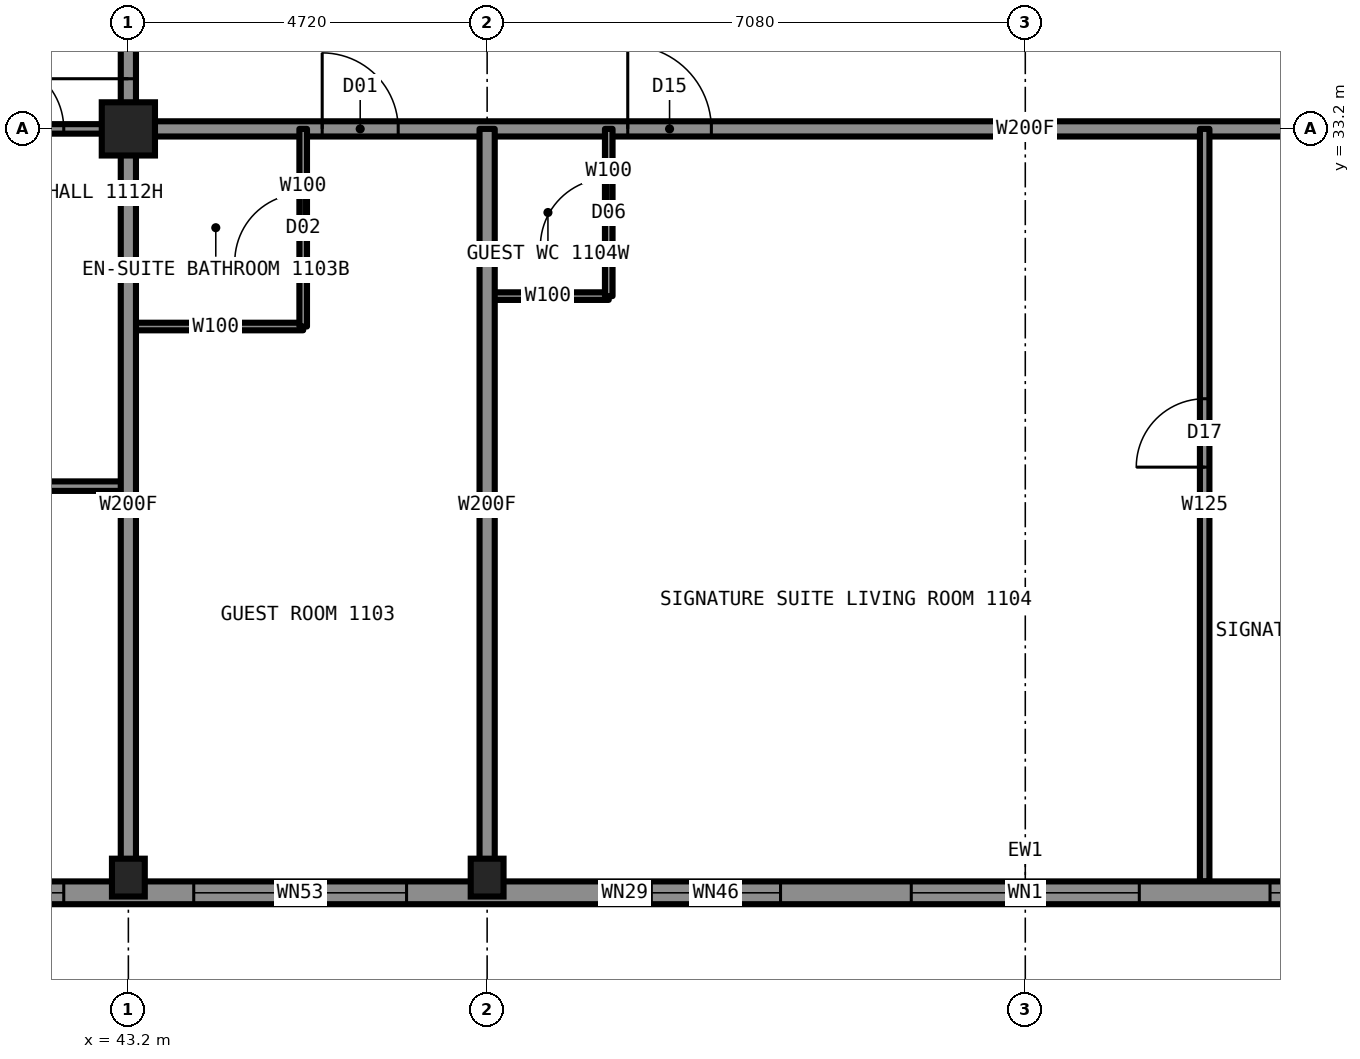
"""IFC4 building model, lengths in metres.
Left out: names, types, materials, properties, quantities, classifications, styles, units other than length and angle.
Written with IfcOpenShell. Run it as: python <this file> out.ifc"""

import sys

from ifc_helpers import new_model, si_unit, direction, frame, frame_2d, origin, origin_2d, place, context, subcontext, project, spatial, rectangle, hollow_rectangle, i_section, extrude, element, fill, save


model = new_model("IFC4")
c1 = context("Model", 3, precision=1e-05, world=origin(), true_north=direction((0.0, 1.0)))
c2 = subcontext(c1, "Body", "Model", "MODEL_VIEW")
j1 = project(units=[si_unit("LENGTHUNIT", "METRE"), si_unit("PLANEANGLEUNIT", "RADIAN")], contexts=[c1])
p1 = place(None, origin())
s1 = spatial("IfcSite", under=j1, at=p1, CompositionType="ELEMENT")
p2 = place(p1, origin())
s2 = spatial("IfcBuilding", under=s1, at=p2, CompositionType="ELEMENT")
p3 = place(p2, frame((0.0, 0.0, 39.0)))
s3 = spatial("IfcBuildingStorey", under=s2, at=p3, CompositionType="ELEMENT", Elevation=39.0)
for number, where, z_axis, x_axis in (
    (1, (43.2, 23.35, 0.0), (0.0, 0.0, 1.0), (1.0, 0.0, 0.0)),
    (2, (47.92, 23.35, 0.0), (0.0, 0.0, 1.0), (1.0, 0.0, 0.0)),
):
    element("IfcColumn", number, at=place(p3, frame(where, z_axis=z_axis, x_axis=x_axis)), inside=s3, PredefinedType="COLUMN", context=c2, shape_type="SweptSolid", body=[
        extrude(i_section(OverallWidth=0.432, OverallDepth=0.498, WebThickness=0.056, FlangeThickness=0.089, at=origin_2d()), origin(), (0.0, 0.0, 1.0), 3.5),
    ])
p4 = place(p3, frame((43.2, 33.2, 0.0), z_axis=(0.0, 0.0, 1.0), x_axis=(1.0, 0.0, 0.0)))
e3 = element("IfcColumn", 3, at=p4, inside=s3, PredefinedType="COLUMN", context=c2, shape_type="SweptSolid", body=[
    extrude(hollow_rectangle(XDim=0.7, YDim=0.7, WallThickness=0.06, at=origin_2d()), origin(), (0.0, 0.0, 1.0), 3.5),
])
p5 = place(p3, frame((43.2, 33.2, 0.0), z_axis=(0.0, 0.0, 1.0), x_axis=(1.0, 0.0, 0.0)))
e4 = element("IfcWall", 4, at=p5, inside=s3, PredefinedType="PARTITIONING", context=c2, shape_type="SweptSolid", body=[
    extrude(rectangle(XDim=23.6, YDim=0.2, at=frame_2d((11.8, 0.0))), origin(), (0.0, 0.0, 1.0), 3.33),
])
p6 = place(p5, frame((2.55, 0.0, 0.0)))
e5 = element("IfcOpeningElement", 5, at=p6, cuts=e4, PredefinedType="OPENING", context=c2, shape_type="SweptSolid", body=[
    extrude(rectangle(XDim=1.0, YDim=2.2, at=frame_2d((0.5, 1.1))), frame((0.0, 0.11, 0.0), z_axis=(0.0, -1.0, 0.0), x_axis=(1.0, 0.0, 0.0)), (0.0, 0.0, 1.0), 0.22),
])
p7 = place(p5, frame((6.57, 0.0, 0.0)))
e6 = element("IfcOpeningElement", 6, at=p7, cuts=e4, PredefinedType="OPENING", context=c2, shape_type="SweptSolid", body=[
    extrude(rectangle(XDim=1.1, YDim=2.2, at=frame_2d((0.55, 1.1))), frame((0.0, 0.11, 0.0), z_axis=(0.0, -1.0, 0.0), x_axis=(1.0, 0.0, 0.0)), (0.0, 0.0, 1.0), 0.22),
])
p8 = place(p5, frame((20.34, 0.0, 0.0)))
e7 = element("IfcOpeningElement", 7, at=p8, cuts=e4, PredefinedType="OPENING", context=c2, shape_type="SweptSolid", body=[
    extrude(rectangle(XDim=1.0, YDim=2.2, at=frame_2d((0.5, 1.1))), frame((0.0, 0.11, 0.0), z_axis=(0.0, -1.0, 0.0), x_axis=(1.0, 0.0, 0.0)), (0.0, 0.0, 1.0), 0.22),
])
p9 = place(p3, frame((33.3, 33.2, 0.0), z_axis=(0.0, 0.0, 1.0), x_axis=(1.0, 0.0, 0.0)))
e8 = element("IfcWall", 8, at=p9, inside=s3, PredefinedType="PARTITIONING", context=c2, shape_type="SweptSolid", body=[
    extrude(rectangle(XDim=9.9, YDim=0.125, at=frame_2d((4.95, 0.0))), origin(), (0.0, 0.0, 1.0), 2.573),
])
p10 = place(p9, frame((8.15, 0.0, 0.0)))
e9 = element("IfcOpeningElement", 9, at=p10, cuts=e8, PredefinedType="OPENING", context=c2, shape_type="SweptSolid", body=[
    extrude(rectangle(XDim=0.9, YDim=2.2, at=frame_2d((0.45, 1.1))), frame((0.0, 0.073, 0.0), z_axis=(0.0, -1.0, 0.0), x_axis=(1.0, 0.0, 0.0)), (0.0, 0.0, 1.0), 0.145),
])
p11 = place(p3, frame((47.92, 31.0, 0.0), z_axis=(0.0, 0.0, 1.0), x_axis=(1.0, 0.0, 0.0)))
e10 = element("IfcWall", 10, at=p11, inside=s3, PredefinedType="PARTITIONING", context=c2, shape_type="SweptSolid", body=[
    extrude(rectangle(XDim=1.6, YDim=0.1, at=frame_2d((0.8, 0.0))), origin(), (0.0, 0.0, 1.0), 3.33),
])
p12 = place(p3, frame((43.2, 30.6, 0.0), z_axis=(0.0, 0.0, 1.0), x_axis=(1.0, 0.0, 0.0)))
e11 = element("IfcWall", 11, at=p12, inside=s3, PredefinedType="PARTITIONING", context=c2, shape_type="SweptSolid", body=[
    extrude(rectangle(XDim=2.3, YDim=0.1, at=frame_2d((1.15, 0.0))), origin(), (0.0, 0.0, 1.0), 3.33),
])
p13 = place(p3, frame((33.306, 28.5, 0.0), z_axis=(0.0, 0.0, 1.0), x_axis=(1.0, 0.0, 0.0)))
e12 = element("IfcWall", 12, at=p13, inside=s3, PredefinedType="PARTITIONING", context=c2, shape_type="SweptSolid", body=[
    extrude(rectangle(XDim=9.894, YDim=0.125, at=frame_2d((4.947, 0.0))), origin(), (0.0, 0.0, 1.0), 3.33),
])
p14 = place(p13, frame((7.244, 0.0, 0.0)))
e13 = element("IfcOpeningElement", 13, at=p14, cuts=e12, PredefinedType="OPENING", context=c2, shape_type="SweptSolid", body=[
    extrude(rectangle(XDim=0.9, YDim=2.2, at=frame_2d((0.45, 1.1))), frame((0.0, 0.073, 0.0), z_axis=(0.0, -1.0, 0.0), x_axis=(1.0, 0.0, 0.0)), (0.0, 0.0, 1.0), 0.145),
])
p15 = place(p3, frame((43.2, 33.2, 0.0), z_axis=(0.0, 0.0, 1.0), x_axis=(0.0, 1.0, 0.0)))
e14 = element("IfcWall", 14, at=p15, inside=s3, PredefinedType="PARTITIONING", context=c2, shape_type="SweptSolid", body=[
    extrude(rectangle(XDim=23.58, YDim=0.2, at=frame_2d((11.79, 0.0))), origin(), (0.0, 0.0, 1.0), 3.33),
])
p16 = place(p15, frame((7.27, 0.0, 0.0)))
e15 = element("IfcOpeningElement", 15, at=p16, cuts=e14, PredefinedType="OPENING", context=c2, shape_type="SweptSolid", body=[
    extrude(rectangle(XDim=1.0, YDim=2.2, at=frame_2d((0.5, 1.1))), frame((0.0, 0.11, 0.0), z_axis=(0.0, -1.0, 0.0), x_axis=(1.0, 0.0, 0.0)), (0.0, 0.0, 1.0), 0.22),
])
p17 = place(p15, frame((12.44, 0.0, 0.0)))
e16 = element("IfcOpeningElement", 16, at=p17, cuts=e14, PredefinedType="OPENING", context=c2, shape_type="SweptSolid", body=[
    extrude(rectangle(XDim=1.0, YDim=2.2, at=frame_2d((0.5, 1.1))), frame((0.0, 0.11, 0.0), z_axis=(0.0, -1.0, 0.0), x_axis=(1.0, 0.0, 0.0)), (0.0, 0.0, 1.0), 0.22),
])
p18 = place(p15, frame((21.84, 0.0, 0.0)))
e17 = element("IfcOpeningElement", 17, at=p18, cuts=e14, PredefinedType="OPENING", context=c2, shape_type="SweptSolid", body=[
    extrude(rectangle(XDim=1.1, YDim=2.2, at=frame_2d((0.55, 1.1))), frame((0.0, 0.11, 0.0), z_axis=(0.0, -1.0, 0.0), x_axis=(1.0, 0.0, 0.0)), (0.0, 0.0, 1.0), 0.22),
])
p19 = place(p15, frame((0.66, 0.0, 0.0)))
e18 = element("IfcOpeningElement", 18, at=p19, cuts=e14, PredefinedType="OPENING", context=c2, shape_type="SweptSolid", body=[
    extrude(rectangle(XDim=1.1, YDim=2.2, at=frame_2d((0.55, 1.1))), frame((0.0, 0.11, 0.0), z_axis=(0.0, -1.0, 0.0), x_axis=(1.0, 0.0, 0.0)), (0.0, 0.0, 1.0), 0.22),
])
p20 = place(p3, frame((43.2, 23.3, 0.0), z_axis=(0.0, 0.0, 1.0), x_axis=(0.0, 1.0, 0.0)))
e19 = element("IfcWall", 19, at=p20, inside=s3, PredefinedType="PARTITIONING", context=c2, shape_type="SweptSolid", body=[
    extrude(rectangle(XDim=9.9, YDim=0.2, at=frame_2d((4.95, 0.0))), origin(), (0.0, 0.0, 1.0), 2.573),
])
p21 = place(p3, frame((49.52, 31.0, 0.0), z_axis=(0.0, 0.0, 1.0), x_axis=(0.0, 1.0, 0.0)))
e20 = element("IfcWall", 20, at=p21, inside=s3, PredefinedType="PARTITIONING", context=c2, shape_type="SweptSolid", body=[
    extrude(rectangle(XDim=2.2, YDim=0.1, at=frame_2d((1.1, 0.0))), origin(), (0.0, 0.0, 1.0), 3.33),
])
p22 = place(p21, frame((0.65, 0.0, 0.0)))
e21 = element("IfcOpeningElement", 21, at=p22, cuts=e20, PredefinedType="OPENING", context=c2, shape_type="SweptSolid", body=[
    extrude(rectangle(XDim=0.9, YDim=2.1, at=frame_2d((0.45, 1.05))), frame((0.0, 0.06, 0.0), z_axis=(0.0, -1.0, 0.0), x_axis=(1.0, 0.0, 0.0)), (0.0, 0.0, 1.0), 0.12),
])
p23 = place(p3, frame((47.92, 23.3, 0.0), z_axis=(0.0, 0.0, 1.0), x_axis=(0.0, 1.0, 0.0)))
e22 = element("IfcWall", 22, at=p23, inside=s3, PredefinedType="PARTITIONING", context=c2, shape_type="SweptSolid", body=[
    extrude(rectangle(XDim=9.9, YDim=0.2, at=frame_2d((4.95, 0.0))), origin(), (0.0, 0.0, 1.0), 2.573),
])
p24 = place(p3, frame((45.5, 30.6, 0.0), z_axis=(0.0, 0.0, 1.0), x_axis=(0.0, 1.0, 0.0)))
e23 = element("IfcWall", 23, at=p24, inside=s3, PredefinedType="PARTITIONING", context=c2, shape_type="SweptSolid", body=[
    extrude(rectangle(XDim=2.6, YDim=0.1, at=frame_2d((1.3, 0.0))), origin(), (0.0, 0.0, 1.0), 3.33),
])
p25 = place(p24, frame((0.85, 0.0, 0.0)))
e24 = element("IfcOpeningElement", 24, at=p25, cuts=e23, PredefinedType="OPENING", context=c2, shape_type="SweptSolid", body=[
    extrude(rectangle(XDim=0.9, YDim=2.1, at=frame_2d((0.45, 1.05))), frame((0.0, 0.06, 0.0), z_axis=(0.0, -1.0, 0.0), x_axis=(1.0, 0.0, 0.0)), (0.0, 0.0, 1.0), 0.12),
])
p26 = place(p3, frame((57.36, 23.3, 0.0), z_axis=(0.0, 0.0, 1.0), x_axis=(0.0, 1.0, 0.0)))
e25 = element("IfcWall", 25, at=p26, inside=s3, PredefinedType="PARTITIONING", context=c2, shape_type="SweptSolid", body=[
    extrude(rectangle(XDim=9.9, YDim=0.125, at=frame_2d((4.95, 0.0))), origin(), (0.0, 0.0, 1.0), 3.33),
])
p27 = place(p26, frame((5.45, 0.0, 0.0)))
e26 = element("IfcOpeningElement", 26, at=p27, cuts=e25, PredefinedType="OPENING", context=c2, shape_type="SweptSolid", body=[
    extrude(rectangle(XDim=0.9, YDim=2.2, at=frame_2d((0.45, 1.1))), frame((0.0, 0.073, 0.0), z_axis=(0.0, -1.0, 0.0), x_axis=(1.0, 0.0, 0.0)), (0.0, 0.0, 1.0), 0.145),
])
p28 = place(p3, frame((38.5, 23.15, 0.0), z_axis=(0.0, 0.0, 1.0), x_axis=(1.0, 0.0, 0.0)))
e27 = element("IfcWall", 27, at=p28, inside=s3, PredefinedType="SOLIDWALL", context=c2, shape_type="SweptSolid", body=[
    extrude(rectangle(XDim=33.0, YDim=0.3, at=frame_2d((16.5, 0.0))), origin(), (0.0, 0.0, 1.0), 2.83),
])
p29 = place(p28, frame((0.85, 0.0, 0.5)))
e28 = element("IfcOpeningElement", 28, at=p29, cuts=e27, PredefinedType="OPENING", context=c2, shape_type="SweptSolid", body=[
    extrude(rectangle(XDim=2.5, YDim=2.0, at=frame_2d((1.25, 1.0))), frame((0.0, 0.16, 0.0), z_axis=(0.0, -1.0, 0.0), x_axis=(1.0, 0.0, 0.0)), (0.0, 0.0, 1.0), 0.32),
])
p30 = place(p28, frame((6.61, 0.0, 0.5)))
e29 = element("IfcOpeningElement", 29, at=p30, cuts=e27, PredefinedType="OPENING", context=c2, shape_type="SweptSolid", body=[
    extrude(rectangle(XDim=1.9, YDim=1.9, at=frame_2d((0.95, 0.95))), frame((0.0, 0.16, 0.0), z_axis=(0.0, -1.0, 0.0), x_axis=(1.0, 0.0, 0.0)), (0.0, 0.0, 1.0), 0.32),
])
p31 = place(p28, frame((10.28, 0.0, 0.5)))
e30 = element("IfcOpeningElement", 30, at=p31, cuts=e27, PredefinedType="OPENING", context=c2, shape_type="SweptSolid", body=[
    extrude(rectangle(XDim=3.0, YDim=2.0, at=frame_2d((1.5, 1.0))), frame((0.0, 0.16, 0.0), z_axis=(0.0, -1.0, 0.0), x_axis=(1.0, 0.0, 0.0)), (0.0, 0.0, 1.0), 0.32),
])
p32 = place(p28, frame((15.0, 0.0, 0.5)))
e31 = element("IfcOpeningElement", 31, at=p32, cuts=e27, PredefinedType="OPENING", context=c2, shape_type="SweptSolid", body=[
    extrude(rectangle(XDim=3.0, YDim=2.0, at=frame_2d((1.5, 1.0))), frame((0.0, 0.16, 0.0), z_axis=(0.0, -1.0, 0.0), x_axis=(1.0, 0.0, 0.0)), (0.0, 0.0, 1.0), 0.32),
])
p33 = place(p28, frame((19.72, 0.0, 0.5)))
e32 = element("IfcOpeningElement", 32, at=p33, cuts=e27, PredefinedType="OPENING", context=c2, shape_type="SweptSolid", body=[
    extrude(rectangle(XDim=3.0, YDim=2.0, at=frame_2d((1.5, 1.0))), frame((0.0, 0.16, 0.0), z_axis=(0.0, -1.0, 0.0), x_axis=(1.0, 0.0, 0.0)), (0.0, 0.0, 1.0), 0.32),
])
p34 = place(p28, frame((24.44, 0.0, 0.5)))
e33 = element("IfcOpeningElement", 33, at=p34, cuts=e27, PredefinedType="OPENING", context=c2, shape_type="SweptSolid", body=[
    extrude(rectangle(XDim=1.9, YDim=1.9, at=frame_2d((0.95, 0.95))), frame((0.0, 0.16, 0.0), z_axis=(0.0, -1.0, 0.0), x_axis=(1.0, 0.0, 0.0)), (0.0, 0.0, 1.0), 0.32),
])
p35 = place(p28, frame((29.6, 0.0, 0.5)))
e34 = element("IfcOpeningElement", 34, at=p35, cuts=e27, PredefinedType="OPENING", context=c2, shape_type="SweptSolid", body=[
    extrude(rectangle(XDim=2.5, YDim=2.0, at=frame_2d((1.25, 1.0))), frame((0.0, 0.16, 0.0), z_axis=(0.0, -1.0, 0.0), x_axis=(1.0, 0.0, 0.0)), (0.0, 0.0, 1.0), 0.32),
])
p36 = place(p28, frame((5.91, 0.0, 0.5)))
e35 = element("IfcOpeningElement", 35, at=p36, cuts=e27, PredefinedType="OPENING", context=c2, shape_type="SweptSolid", body=[
    extrude(rectangle(XDim=0.7, YDim=1.0, at=frame_2d((0.35, 0.5))), frame((0.0, 0.16, 0.0), z_axis=(0.0, -1.0, 0.0), x_axis=(1.0, 0.0, 0.0)), (0.0, 0.0, 1.0), 0.32),
])
p37 = place(p28, frame((26.39, 0.0, 0.5)))
e36 = element("IfcOpeningElement", 36, at=p37, cuts=e27, PredefinedType="OPENING", context=c2, shape_type="SweptSolid", body=[
    extrude(rectangle(XDim=0.7, YDim=1.0, at=frame_2d((0.35, 0.5))), frame((0.0, 0.16, 0.0), z_axis=(0.0, -1.0, 0.0), x_axis=(1.0, 0.0, 0.0)), (0.0, 0.0, 1.0), 0.32),
])
p38 = place(p6, origin())
e37 = element("IfcDoor", 37, at=p38, inside=s3, OperationType="SINGLE_SWING_LEFT", PredefinedType="DOOR", context=c2, shape_type="SweptSolid", body=[
    extrude(rectangle(XDim=1.0, YDim=2.2, at=frame_2d((0.5, 1.1))), frame((0.0, 0.025, 0.0), z_axis=(0.0, -1.0, 0.0), x_axis=(1.0, 0.0, 0.0)), (0.0, 0.0, 1.0), 0.05),
])
fill(e5, e37)
p39 = place(p25, origin())
e38 = element("IfcDoor", 38, at=p39, inside=s3, OperationType="SINGLE_SWING_RIGHT", PredefinedType="DOOR", context=c2, shape_type="SweptSolid", body=[
    extrude(rectangle(XDim=0.9, YDim=2.1, at=frame_2d((0.45, 1.05))), frame((0.0, 0.025, 0.0), z_axis=(0.0, -1.0, 0.0), x_axis=(1.0, 0.0, 0.0)), (0.0, 0.0, 1.0), 0.05),
])
fill(e24, e38)
p40 = place(p7, origin())
e39 = element("IfcDoor", 39, at=p40, inside=s3, OperationType="SINGLE_SWING_LEFT", PredefinedType="DOOR", context=c2, shape_type="SweptSolid", body=[
    extrude(rectangle(XDim=1.1, YDim=2.2, at=frame_2d((0.55, 1.1))), frame((0.0, 0.025, 0.0), z_axis=(0.0, -1.0, 0.0), x_axis=(1.0, 0.0, 0.0)), (0.0, 0.0, 1.0), 0.05),
])
fill(e6, e39)
p41 = place(p27, origin())
e40 = element("IfcDoor", 40, at=p41, inside=s3, OperationType="SINGLE_SWING_LEFT", PredefinedType="DOOR", context=c2, shape_type="SweptSolid", body=[
    extrude(rectangle(XDim=0.9, YDim=2.2, at=frame_2d((0.45, 1.1))), frame((0.0, 0.025, 0.0), z_axis=(0.0, -1.0, 0.0), x_axis=(1.0, 0.0, 0.0)), (0.0, 0.0, 1.0), 0.05),
])
fill(e26, e40)
p42 = place(p22, origin())
e41 = element("IfcDoor", 41, at=p42, inside=s3, OperationType="SINGLE_SWING_LEFT", PredefinedType="DOOR", context=c2, shape_type="SweptSolid", body=[
    extrude(rectangle(XDim=0.9, YDim=2.1, at=frame_2d((0.45, 1.05))), frame((0.0, 0.025, 0.0), z_axis=(0.0, -1.0, 0.0), x_axis=(1.0, 0.0, 0.0)), (0.0, 0.0, 1.0), 0.05),
])
fill(e21, e41)
p43 = place(p10, origin())
e42 = element("IfcDoor", 42, at=p43, inside=s3, OperationType="SINGLE_SWING_LEFT", PredefinedType="DOOR", context=c2, shape_type="SweptSolid", body=[
    extrude(rectangle(XDim=0.9, YDim=2.2, at=frame_2d((0.45, 1.1))), frame((0.0, 0.025, 0.0), z_axis=(0.0, -1.0, 0.0), x_axis=(1.0, 0.0, 0.0)), (0.0, 0.0, 1.0), 0.05),
])
fill(e9, e42)
p44 = place(p19, origin())
e43 = element("IfcDoor", 43, at=p44, inside=s3, OperationType="SINGLE_SWING_LEFT", PredefinedType="DOOR", context=c2, shape_type="SweptSolid", body=[
    extrude(rectangle(XDim=1.1, YDim=2.2, at=frame_2d((0.55, 1.1))), frame((0.0, 0.025, 0.0), z_axis=(0.0, -1.0, 0.0), x_axis=(1.0, 0.0, 0.0)), (0.0, 0.0, 1.0), 0.05),
])
fill(e18, e43)
p45 = place(p30, origin())
e44 = element("IfcWindow", 44, at=p45, inside=s3, PartitioningType="SINGLE_PANEL", PredefinedType="WINDOW", context=c2, shape_type="SweptSolid", body=[
    extrude(rectangle(XDim=1.9, YDim=1.9, at=frame_2d((0.95, 0.95))), frame((0.0, 0.03, 0.0), z_axis=(0.0, -1.0, 0.0), x_axis=(1.0, 0.0, 0.0)), (0.0, 0.0, 1.0), 0.06),
])
fill(e29, e44)
p46 = place(p31, origin())
e45 = element("IfcWindow", 45, at=p46, inside=s3, PartitioningType="SINGLE_PANEL", PredefinedType="WINDOW", context=c2, shape_type="SweptSolid", body=[
    extrude(rectangle(XDim=3.0, YDim=2.0, at=frame_2d((1.5, 1.0))), frame((0.0, 0.03, 0.0), z_axis=(0.0, -1.0, 0.0), x_axis=(1.0, 0.0, 0.0)), (0.0, 0.0, 1.0), 0.06),
])
fill(e30, e45)
p47 = place(p32, origin())
e46 = element("IfcWindow", 46, at=p47, inside=s3, PartitioningType="SINGLE_PANEL", PredefinedType="WINDOW", context=c2, shape_type="SweptSolid", body=[
    extrude(rectangle(XDim=3.0, YDim=2.0, at=frame_2d((1.5, 1.0))), frame((0.0, 0.03, 0.0), z_axis=(0.0, -1.0, 0.0), x_axis=(1.0, 0.0, 0.0)), (0.0, 0.0, 1.0), 0.06),
])
fill(e31, e46)
p48 = place(p33, origin())
e47 = element("IfcWindow", 47, at=p48, inside=s3, PartitioningType="SINGLE_PANEL", PredefinedType="WINDOW", context=c2, shape_type="SweptSolid", body=[
    extrude(rectangle(XDim=3.0, YDim=2.0, at=frame_2d((1.5, 1.0))), frame((0.0, 0.03, 0.0), z_axis=(0.0, -1.0, 0.0), x_axis=(1.0, 0.0, 0.0)), (0.0, 0.0, 1.0), 0.06),
])
fill(e32, e47)
p49 = place(p36, origin())
e48 = element("IfcWindow", 48, at=p49, inside=s3, PartitioningType="SINGLE_PANEL", PredefinedType="WINDOW", context=c2, shape_type="SweptSolid", body=[
    extrude(rectangle(XDim=0.7, YDim=1.0, at=frame_2d((0.35, 0.5))), frame((0.0, 0.03, 0.0), z_axis=(0.0, -1.0, 0.0), x_axis=(1.0, 0.0, 0.0)), (0.0, 0.0, 1.0), 0.06),
])
fill(e35, e48)
save(model, sys.argv[1])
